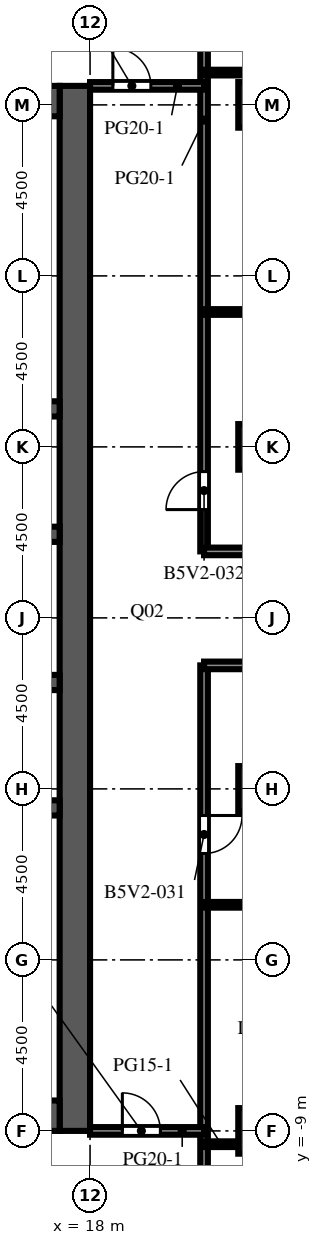
"""IFC4 building model, lengths in metres.
Left out: names, types, materials, properties, quantities, classifications, styles, units other than length and angle.
Written with IfcOpenShell. Run it as: python <this file> out.ifc"""

import sys

from ifc_helpers import new_model, si_unit, direction, frame, frame_2d, origin, origin_2d, place, context, subcontext, project, spatial, rectangle, extrude, element, fill, save


model = new_model("IFC4")
c1 = context("Model", 3, precision=1e-05, world=origin(), true_north=direction((0.0, 1.0)))
c2 = subcontext(c1, "Body", "Model", "MODEL_VIEW")
j1 = project(units=[si_unit("LENGTHUNIT", "METRE"), si_unit("PLANEANGLEUNIT", "RADIAN")], contexts=[c1])
p1 = place(None, origin())
s1 = spatial("IfcSite", under=j1, at=p1, CompositionType="ELEMENT")
p2 = place(p1, origin())
s2 = spatial("IfcBuilding", under=s1, at=p2, CompositionType="ELEMENT")
p3 = place(p2, frame((0.0, 0.0, 177.3)))
s3 = spatial("IfcBuildingStorey", under=s2, at=p3, CompositionType="ELEMENT", Elevation=177.3)
for number, where, z_axis, x_axis in (
    (1, (22.5, -9.0, 0.0), (0.0, 0.0, 1.0), (1.0, 0.0, 0.0)),
    (2, (22.5, 0.0, 0.0), (0.0, 0.0, 1.0), (1.0, 0.0, 0.0)),
    (3, (22.5, 9.0, 0.0), (0.0, 0.0, 1.0), (1.0, 0.0, 0.0)),
    (4, (22.5, 18.0, 0.0), (0.0, 0.0, 1.0), (1.0, 0.0, 0.0)),
):
    element("IfcColumn", number, at=place(p3, frame(where, z_axis=z_axis, x_axis=x_axis)), inside=s3, PredefinedType="COLUMN", context=c2, shape_type="SweptSolid", body=[
        extrude(rectangle(XDim=1.2, YDim=1.2, at=origin_2d()), origin(), (0.0, 0.0, 1.0), 4.1),
    ])
p4 = place(p3, frame((17.6, -9.0, 0.0), z_axis=(0.0, 0.0, 1.0), x_axis=(0.0, 1.0, 0.0)))
e5 = element("IfcWall", 5, at=p4, inside=s3, PredefinedType="SHEAR", context=c2, shape_type="SweptSolid", body=[
    extrude(rectangle(XDim=27.5, YDim=0.8, at=frame_2d((13.75, 0.0))), origin(), (0.0, 0.0, 1.0), 4.1),
])
p5 = place(p4, frame((12.55, 0.0, 0.0)))
e6 = element("IfcOpeningElement", 6, at=p5, cuts=e5, PredefinedType="OPENING", context=c2, shape_type="SweptSolid", body=[
    extrude(rectangle(XDim=2.4, YDim=2.4, at=frame_2d((1.2, 1.2))), frame((0.0, 0.41, 0.0), z_axis=(0.0, -1.0, 0.0), x_axis=(1.0, 0.0, 0.0)), (0.0, 0.0, 1.0), 0.82),
])
p6 = place(p4, frame((6.825, 0.0, 0.0)))
e7 = element("IfcOpeningElement", 7, at=p6, cuts=e5, PredefinedType="OPENING", context=c2, shape_type="SweptSolid", body=[
    extrude(rectangle(XDim=1.2, YDim=2.1, at=frame_2d((0.6, 1.05))), frame((0.0, 0.41, 0.0), z_axis=(0.0, -1.0, 0.0), x_axis=(1.0, 0.0, 0.0)), (0.0, 0.0, 1.0), 0.82),
])
p7 = place(p4, frame((19.475, 0.0, 0.0)))
e8 = element("IfcOpeningElement", 8, at=p7, cuts=e5, PredefinedType="OPENING", context=c2, shape_type="SweptSolid", body=[
    extrude(rectangle(XDim=1.2, YDim=2.1, at=frame_2d((0.6, 1.05))), frame((0.0, 0.41, 0.0), z_axis=(0.0, -1.0, 0.0), x_axis=(1.0, 0.0, 0.0)), (0.0, 0.0, 1.0), 0.82),
])
for number, where, z_axis, x_axis in (
    (9, (6.8, -8.6, 0.0), (0.0, 0.0, 1.0), (1.0, 0.0, 0.0)),
    (10, (6.8, 18.1, 0.0), (0.0, 0.0, 1.0), (1.0, 0.0, 0.0)),
):
    element("IfcWall", number, at=place(p3, frame(where, z_axis=z_axis, x_axis=x_axis)), inside=s3, PredefinedType="SHEAR", context=c2, shape_type="SweptSolid", body=[
        extrude(rectangle(XDim=10.4, YDim=0.8, at=frame_2d((5.2, 0.0))), origin(), (0.0, 0.0, 1.0), 4.1),
    ])
p8 = place(p3, frame((6.8, -0.5, 0.0), z_axis=(0.0, 0.0, 1.0), x_axis=(1.0, 0.0, 0.0)))
e11 = element("IfcWall", 11, at=p8, inside=s3, PredefinedType="SHEAR", context=c2, shape_type="SweptSolid", body=[
    extrude(rectangle(XDim=10.4, YDim=0.4, at=frame_2d((5.2, 0.0))), origin(), (0.0, 0.0, 1.0), 4.1),
])
p9 = place(p3, frame((6.8, 2.8, 0.0), z_axis=(0.0, 0.0, 1.0), x_axis=(1.0, 0.0, 0.0)))
e12 = element("IfcWall", 12, at=p9, inside=s3, PredefinedType="SHEAR", context=c2, shape_type="SweptSolid", body=[
    extrude(rectangle(XDim=10.4, YDim=0.4, at=frame_2d((5.2, 0.0))), origin(), (0.0, 0.0, 1.0), 4.1),
])
p10 = place(p9, frame((0.738, 0.0, 0.0)))
e13 = element("IfcOpeningElement", 13, at=p10, cuts=e12, PredefinedType="OPENING", context=c2, shape_type="SweptSolid", body=[
    extrude(rectangle(XDim=1.1, YDim=2.1, at=frame_2d((0.55, 1.05))), frame((0.0, 0.21, 0.0), z_axis=(0.0, -1.0, 0.0), x_axis=(1.0, 0.0, 0.0)), (0.0, 0.0, 1.0), 0.42),
])
p11 = place(p9, frame((3.337, 0.0, 0.0)))
e14 = element("IfcOpeningElement", 14, at=p11, cuts=e12, PredefinedType="OPENING", context=c2, shape_type="SweptSolid", body=[
    extrude(rectangle(XDim=1.1, YDim=2.1, at=frame_2d((0.55, 1.05))), frame((0.0, 0.21, 0.0), z_axis=(0.0, -1.0, 0.0), x_axis=(1.0, 0.0, 0.0)), (0.0, 0.0, 1.0), 0.42),
])
p12 = place(p9, frame((6.012, 0.0, 0.0)))
e15 = element("IfcOpeningElement", 15, at=p12, cuts=e12, PredefinedType="OPENING", context=c2, shape_type="SweptSolid", body=[
    extrude(rectangle(XDim=1.0, YDim=2.1, at=frame_2d((0.5, 1.05))), frame((0.0, 0.21, 0.0), z_axis=(0.0, -1.0, 0.0), x_axis=(1.0, 0.0, 0.0)), (0.0, 0.0, 1.0), 0.42),
])
p13 = place(p9, frame((8.613, 0.0, 0.0)))
e16 = element("IfcOpeningElement", 16, at=p13, cuts=e12, PredefinedType="OPENING", context=c2, shape_type="SweptSolid", body=[
    extrude(rectangle(XDim=1.0, YDim=2.1, at=frame_2d((0.5, 1.05))), frame((0.0, 0.21, 0.0), z_axis=(0.0, -1.0, 0.0), x_axis=(1.0, 0.0, 0.0)), (0.0, 0.0, 1.0), 0.42),
])
p14 = place(p3, frame((6.8, 6.7, 0.0), z_axis=(0.0, 0.0, 1.0), x_axis=(1.0, 0.0, 0.0)))
e17 = element("IfcWall", 17, at=p14, inside=s3, PredefinedType="SHEAR", context=c2, shape_type="SweptSolid", body=[
    extrude(rectangle(XDim=10.4, YDim=0.4, at=frame_2d((5.2, 0.0))), origin(), (0.0, 0.0, 1.0), 4.1),
])
p15 = place(p14, frame((3.337, 0.0, 0.0)))
e18 = element("IfcOpeningElement", 18, at=p15, cuts=e17, PredefinedType="OPENING", context=c2, shape_type="SweptSolid", body=[
    extrude(rectangle(XDim=1.1, YDim=2.1, at=frame_2d((0.55, 1.05))), frame((0.0, 0.21, 0.0), z_axis=(0.0, -1.0, 0.0), x_axis=(1.0, 0.0, 0.0)), (0.0, 0.0, 1.0), 0.42),
])
p16 = place(p14, frame((5.962, 0.0, 0.0)))
e19 = element("IfcOpeningElement", 19, at=p16, cuts=e17, PredefinedType="OPENING", context=c2, shape_type="SweptSolid", body=[
    extrude(rectangle(XDim=1.1, YDim=2.1, at=frame_2d((0.55, 1.05))), frame((0.0, 0.21, 0.0), z_axis=(0.0, -1.0, 0.0), x_axis=(1.0, 0.0, 0.0)), (0.0, 0.0, 1.0), 0.42),
])
p17 = place(p14, frame((8.663, 0.0, 0.0)))
e20 = element("IfcOpeningElement", 20, at=p17, cuts=e17, PredefinedType="OPENING", context=c2, shape_type="SweptSolid", body=[
    extrude(rectangle(XDim=1.1, YDim=2.1, at=frame_2d((0.55, 1.05))), frame((0.0, 0.21, 0.0), z_axis=(0.0, -1.0, 0.0), x_axis=(1.0, 0.0, 0.0)), (0.0, 0.0, 1.0), 0.42),
])
p18 = place(p14, frame((0.688, 0.0, 0.0)))
e21 = element("IfcOpeningElement", 21, at=p18, cuts=e17, PredefinedType="OPENING", context=c2, shape_type="SweptSolid", body=[
    extrude(rectangle(XDim=1.0, YDim=2.1, at=frame_2d((0.5, 1.05))), frame((0.0, 0.21, 0.0), z_axis=(0.0, -1.0, 0.0), x_axis=(1.0, 0.0, 0.0)), (0.0, 0.0, 1.0), 0.42),
])
p19 = place(p3, frame((6.8, 10.0, 0.0), z_axis=(0.0, 0.0, 1.0), x_axis=(1.0, 0.0, 0.0)))
e22 = element("IfcWall", 22, at=p19, inside=s3, PredefinedType="SHEAR", context=c2, shape_type="SweptSolid", body=[
    extrude(rectangle(XDim=10.4, YDim=0.4, at=frame_2d((5.2, 0.0))), origin(), (0.0, 0.0, 1.0), 4.1),
])
p20 = place(p3, frame((21.0, 3.25, 0.0), z_axis=(0.0, 0.0, 1.0), x_axis=(0.0, -1.0, 0.0)))
e23 = element("IfcWall", 23, at=p20, inside=s3, PredefinedType="PARTITIONING", context=c2, shape_type="SweptSolid", body=[
    extrude(rectangle(XDim=30.1, YDim=0.2, at=frame_2d((15.05, 0.0))), origin(), (0.0, 0.0, 1.0), 3.65),
])
p21 = place(p20, frame((3.95, 0.0, 0.0)))
e24 = element("IfcOpeningElement", 24, at=p21, cuts=e23, PredefinedType="OPENING", context=c2, shape_type="SweptSolid", body=[
    extrude(rectangle(XDim=1.0, YDim=2.1, at=frame_2d((0.5, 1.05))), frame((0.0, 0.11, 0.0), z_axis=(0.0, -1.0, 0.0), x_axis=(1.0, 0.0, 0.0)), (0.0, 0.0, 1.0), 0.22),
])
p22 = place(p3, frame((21.0, 26.85, 0.0), z_axis=(0.0, 0.0, 1.0), x_axis=(0.0, -1.0, 0.0)))
e25 = element("IfcWall", 25, at=p22, inside=s3, PredefinedType="PARTITIONING", context=c2, shape_type="SweptSolid", body=[
    extrude(rectangle(XDim=20.6, YDim=0.2, at=frame_2d((10.3, 0.0))), origin(), (0.0, 0.0, 1.0), 3.65),
])
p23 = place(p22, frame((18.5, 0.0, 0.0)))
e26 = element("IfcOpeningElement", 26, at=p23, cuts=e25, PredefinedType="OPENING", context=c2, shape_type="SweptSolid", body=[
    extrude(rectangle(XDim=1.0, YDim=2.1, at=frame_2d((0.5, 1.05))), frame((0.0, 0.11, 0.0), z_axis=(0.0, -1.0, 0.0), x_axis=(1.0, 0.0, 0.0)), (0.0, 0.0, 1.0), 0.22),
])
p24 = place(p3, frame((21.0, -9.35, 0.0), z_axis=(0.0, 0.0, 1.0), x_axis=(1.0, 0.0, 0.0)))
e27 = element("IfcWall", 27, at=p24, inside=s3, PredefinedType="PARTITIONING", context=c2, shape_type="SweptSolid", body=[
    extrude(rectangle(XDim=0.9, YDim=0.15, at=frame_2d((0.45, 0.0))), origin(), (0.0, 0.0, 1.0), 3.65),
])
p25 = place(p3, frame((21.0, -9.0, 0.0), z_axis=(0.0, 0.0, 1.0), x_axis=(-1.0, 0.0, 0.0)))
e28 = element("IfcWall", 28, at=p25, inside=s3, PredefinedType="PARTITIONING", context=c2, shape_type="SweptSolid", body=[
    extrude(rectangle(XDim=3.0, YDim=0.2, at=frame_2d((1.5, 0.0))), origin(), (0.0, 0.0, 1.0), 3.65),
])
p26 = place(p25, frame((1.15, 0.0, 0.0)))
e29 = element("IfcOpeningElement", 29, at=p26, cuts=e28, PredefinedType="OPENING", context=c2, shape_type="SweptSolid", body=[
    extrude(rectangle(XDim=1.0, YDim=2.1, at=frame_2d((0.5, 1.05))), frame((0.0, 0.11, 0.0), z_axis=(0.0, -1.0, 0.0), x_axis=(1.0, 0.0, 0.0)), (0.0, 0.0, 1.0), 0.22),
])
p27 = place(p3, frame((26.85, -3.05, 0.0), z_axis=(0.0, 0.0, 1.0), x_axis=(-1.0, 0.0, 0.0)))
e30 = element("IfcWall", 30, at=p27, inside=s3, PredefinedType="PARTITIONING", context=c2, shape_type="SweptSolid", body=[
    extrude(rectangle(XDim=5.85, YDim=0.15, at=frame_2d((2.925, 0.0))), origin(), (0.0, 0.0, 1.0), 3.65),
])
p28 = place(p27, frame((2.5, 0.0, 0.0)))
e31 = element("IfcOpeningElement", 31, at=p28, cuts=e30, PredefinedType="OPENING", context=c2, shape_type="SweptSolid", body=[
    extrude(rectangle(XDim=1.0, YDim=2.1, at=frame_2d((0.5, 1.05))), frame((0.0, 0.085, 0.0), z_axis=(0.0, -1.0, 0.0), x_axis=(1.0, 0.0, 0.0)), (0.0, 0.0, 1.0), 0.17),
])
for number, where, z_axis, x_axis in (
    (32, (21.0, 3.25, 0.0), (0.0, 0.0, 1.0), (1.0, 0.0, 0.0)),
    (33, (21.0, 6.25, 0.0), (0.0, 0.0, 1.0), (1.0, 0.0, 0.0)),
):
    element("IfcWall", number, at=place(p3, frame(where, z_axis=z_axis, x_axis=x_axis)), inside=s3, PredefinedType="PARTITIONING", context=c2, shape_type="SweptSolid", body=[
        extrude(rectangle(XDim=5.85, YDim=0.2, at=frame_2d((2.925, 0.0))), origin(), (0.0, 0.0, 1.0), 3.65),
    ])
p29 = place(p3, frame((21.0, 12.55, 0.0), z_axis=(0.0, 0.0, 1.0), x_axis=(1.0, 0.0, 0.0)))
e34 = element("IfcWall", 34, at=p29, inside=s3, PredefinedType="PARTITIONING", context=c2, shape_type="SweptSolid", body=[
    extrude(rectangle(XDim=5.85, YDim=0.15, at=frame_2d((2.925, 0.0))), origin(), (0.0, 0.0, 1.0), 3.65),
])
p30 = place(p29, frame((3.1, 0.0, 0.0)))
e35 = element("IfcOpeningElement", 35, at=p30, cuts=e34, PredefinedType="OPENING", context=c2, shape_type="SweptSolid", body=[
    extrude(rectangle(XDim=1.0, YDim=2.1, at=frame_2d((0.5, 1.05))), frame((0.0, 0.085, 0.0), z_axis=(0.0, -1.0, 0.0), x_axis=(1.0, 0.0, 0.0)), (0.0, 0.0, 1.0), 0.17),
])
p31 = place(p3, frame((18.0, 18.5, 0.0), z_axis=(0.0, 0.0, 1.0), x_axis=(1.0, 0.0, 0.0)))
e36 = element("IfcWall", 36, at=p31, inside=s3, PredefinedType="PARTITIONING", context=c2, shape_type="SweptSolid", body=[
    extrude(rectangle(XDim=3.0, YDim=0.2, at=frame_2d((1.5, 0.0))), origin(), (0.0, 0.0, 1.0), 3.65),
])
p32 = place(p31, frame((0.6, 0.0, 0.0)))
e37 = element("IfcOpeningElement", 37, at=p32, cuts=e36, PredefinedType="OPENING", context=c2, shape_type="SweptSolid", body=[
    extrude(rectangle(XDim=1.0, YDim=2.1, at=frame_2d((0.5, 1.05))), frame((0.0, 0.11, 0.0), z_axis=(0.0, -1.0, 0.0), x_axis=(1.0, 0.0, 0.0)), (0.0, 0.0, 1.0), 0.22),
])
p33 = place(p3, frame((21.0, 18.85, 0.0), z_axis=(0.0, 0.0, 1.0), x_axis=(1.0, 0.0, 0.0)))
e38 = element("IfcWall", 38, at=p33, inside=s3, PredefinedType="PARTITIONING", context=c2, shape_type="SweptSolid", body=[
    extrude(rectangle(XDim=5.85, YDim=0.15, at=frame_2d((2.925, 0.0))), origin(), (0.0, 0.0, 1.0), 3.65),
])
p34 = place(p33, frame((2.6, 0.0, 0.0)))
e39 = element("IfcOpeningElement", 39, at=p34, cuts=e38, PredefinedType="OPENING", context=c2, shape_type="SweptSolid", body=[
    extrude(rectangle(XDim=1.0, YDim=2.1, at=frame_2d((0.5, 1.05))), frame((0.0, 0.085, 0.0), z_axis=(0.0, -1.0, 0.0), x_axis=(1.0, 0.0, 0.0)), (0.0, 0.0, 1.0), 0.17),
])
p35 = place(p5, origin())
e40 = element("IfcDoor", 40, at=p35, inside=s3, OperationType="DOUBLE_DOOR_DOUBLE_SWING", PredefinedType="DOOR", context=c2, shape_type="SweptSolid", body=[
    extrude(rectangle(XDim=2.4, YDim=2.4, at=frame_2d((1.2, 1.2))), frame((0.0, 0.025, 0.0), z_axis=(0.0, -1.0, 0.0), x_axis=(1.0, 0.0, 0.0)), (0.0, 0.0, 1.0), 0.05),
])
fill(e6, e40)
p36 = place(p6, frame((1.2, 0.0, 0.0), z_axis=(0.0, 0.0, 1.0), x_axis=(-1.0, 0.0, 0.0)))
e41 = element("IfcDoor", 41, at=p36, inside=s3, OperationType="SINGLE_SWING_LEFT", PredefinedType="DOOR", context=c2, shape_type="SweptSolid", body=[
    extrude(rectangle(XDim=1.2, YDim=2.1, at=frame_2d((0.6, 1.05))), frame((0.0, 0.025, 0.0), z_axis=(0.0, -1.0, 0.0), x_axis=(1.0, 0.0, 0.0)), (0.0, 0.0, 1.0), 0.05),
])
fill(e7, e41)
p37 = place(p7, frame((1.2, 0.0, 0.0), z_axis=(0.0, 0.0, 1.0), x_axis=(-1.0, 0.0, 0.0)))
e42 = element("IfcDoor", 42, at=p37, inside=s3, OperationType="SINGLE_SWING_LEFT", PredefinedType="DOOR", context=c2, shape_type="SweptSolid", body=[
    extrude(rectangle(XDim=1.2, YDim=2.1, at=frame_2d((0.6, 1.05))), frame((0.0, 0.025, 0.0), z_axis=(0.0, -1.0, 0.0), x_axis=(1.0, 0.0, 0.0)), (0.0, 0.0, 1.0), 0.05),
])
fill(e8, e42)
p38 = place(p26, origin())
e43 = element("IfcDoor", 43, at=p38, inside=s3, OperationType="SINGLE_SWING_RIGHT", PredefinedType="DOOR", context=c2, shape_type="SweptSolid", body=[
    extrude(rectangle(XDim=1.0, YDim=2.1, at=frame_2d((0.5, 1.05))), frame((0.0, 0.025, 0.0), z_axis=(0.0, -1.0, 0.0), x_axis=(1.0, 0.0, 0.0)), (0.0, 0.0, 1.0), 0.05),
])
fill(e29, e43)
p39 = place(p32, origin())
e44 = element("IfcDoor", 44, at=p39, inside=s3, OperationType="SINGLE_SWING_LEFT", PredefinedType="DOOR", context=c2, shape_type="SweptSolid", body=[
    extrude(rectangle(XDim=1.0, YDim=2.1, at=frame_2d((0.5, 1.05))), frame((0.0, 0.025, 0.0), z_axis=(0.0, -1.0, 0.0), x_axis=(1.0, 0.0, 0.0)), (0.0, 0.0, 1.0), 0.05),
])
fill(e37, e44)
p40 = place(p21, origin())
e45 = element("IfcDoor", 45, at=p40, inside=s3, OperationType="SINGLE_SWING_LEFT", PredefinedType="DOOR", context=c2, shape_type="SweptSolid", body=[
    extrude(rectangle(XDim=1.0, YDim=2.1, at=frame_2d((0.5, 1.05))), frame((0.0, 0.025, 0.0), z_axis=(0.0, -1.0, 0.0), x_axis=(1.0, 0.0, 0.0)), (0.0, 0.0, 1.0), 0.05),
])
fill(e24, e45)
p41 = place(p23, origin())
e46 = element("IfcDoor", 46, at=p41, inside=s3, OperationType="SINGLE_SWING_RIGHT", PredefinedType="DOOR", context=c2, shape_type="SweptSolid", body=[
    extrude(rectangle(XDim=1.0, YDim=2.1, at=frame_2d((0.5, 1.05))), frame((0.0, 0.025, 0.0), z_axis=(0.0, -1.0, 0.0), x_axis=(1.0, 0.0, 0.0)), (0.0, 0.0, 1.0), 0.05),
])
fill(e26, e46)
save(model, sys.argv[1])
